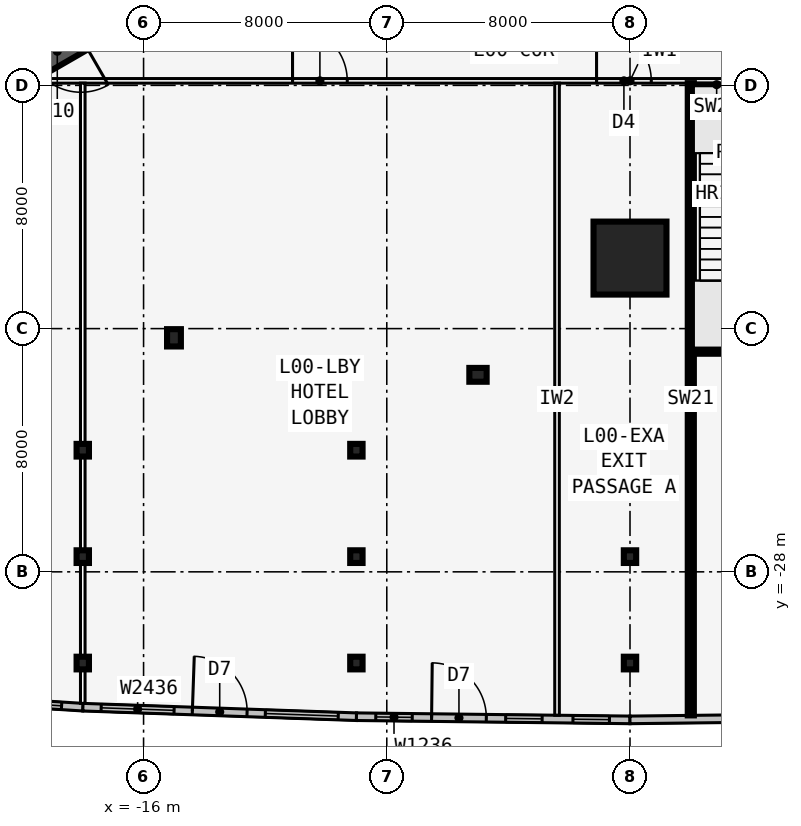
"""IFC4 building model, lengths in metres.
Left out: names, types, materials, properties, quantities, classifications, styles, units other than length and angle.
Written with IfcOpenShell. Run it as: python <this file> out.ifc"""

import sys

from ifc_helpers import new_model, si_unit, direction, frame, frame_2d, origin, origin_2d, place, context, subcontext, project, spatial, rectangle, i_section, extrude, element, fill, save


model = new_model("IFC4")
c1 = context("Model", 3, precision=1e-05, world=origin(), true_north=direction((0.0, 1.0)))
c2 = subcontext(c1, "Body", "Model", "MODEL_VIEW")
j1 = project(units=[si_unit("LENGTHUNIT", "METRE"), si_unit("PLANEANGLEUNIT", "RADIAN")], contexts=[c1])
p1 = place(None, origin())
s1 = spatial("IfcSite", under=j1, at=p1, CompositionType="ELEMENT")
p2 = place(p1, origin())
s2 = spatial("IfcBuilding", under=s1, at=p2, CompositionType="ELEMENT")
p3 = place(p2, origin())
s3 = spatial("IfcBuildingStorey", under=s2, at=p3, CompositionType="ELEMENT", Elevation=0.0)
p4 = place(p3, frame((-16.5, -9.526, -0.3), z_axis=(0.0, 0.0, 1.0), x_axis=(-0.866031398331, -0.499989616998, 0.0)))
e1 = element("IfcWall", 1, at=p4, inside=s3, PredefinedType="SHEAR", context=c2, shape_type="SweptSolid", body=[
    extrude(rectangle(XDim=4.746, YDim=0.9, at=frame_2d((2.373, 0.0))), origin(), (0.0, 0.0, 1.0), 6.3),
])
p5 = place(p4, frame((1.8, 0.0, 0.3)))
e2 = element("IfcOpeningElement", 2, at=p5, cuts=e1, PredefinedType="OPENING", context=c2, shape_type="SweptSolid", body=[
    extrude(rectangle(XDim=1.8, YDim=2.13, at=frame_2d((0.9, 1.065))), frame((0.0, 0.46, 0.0), z_axis=(0.0, -1.0, 0.0), x_axis=(1.0, 0.0, 0.0)), (0.0, 0.0, 1.0), 0.92),
])
for number, where, z_axis, x_axis in (
    (3, (-15.0, -20.303, -0.3), (0.0, 0.0, 1.0), (1.0, 0.0, 0.0)),
    (4, (-5.0, -21.521, -0.3), (0.0, 0.0, 1.0), (0.0, -1.0, 0.0)),
):
    element("IfcColumn", number, at=place(p3, frame(where, z_axis=z_axis, x_axis=x_axis)), inside=s3, PredefinedType="COLUMN", context=c2, shape_type="SweptSolid", body=[
        extrude(i_section(OverallWidth=0.455, OverallDepth=0.569, WebThickness=0.078, FlangeThickness=0.125, at=origin_2d()), origin(), (0.0, 0.0, 1.0), 6.3),
    ])
for number, where, z_axis, x_axis in (
    (5, (-18.0, -24.0, -0.3), (0.0, 0.0, 1.0), (1.0, 0.0, 0.0)),
    (6, (-9.0, -24.0, -0.3), (0.0, 0.0, 1.0), (1.0, 0.0, 0.0)),
    (7, (0.0, -24.0, -0.3), (0.0, 0.0, 1.0), (1.0, 0.0, 0.0)),
    (8, (-18.0, -27.5, -0.3), (0.0, 0.0, 1.0), (1.0, 0.0, 0.0)),
    (9, (-9.0, -27.5, -0.3), (0.0, 0.0, 1.0), (1.0, 0.0, 0.0)),
    (10, (0.0, -27.5, -0.3), (0.0, 0.0, 1.0), (1.0, 0.0, 0.0)),
    (11, (-18.0, -31.0, -0.3), (0.0, 0.0, 1.0), (1.0, 0.0, 0.0)),
    (12, (-9.0, -31.0, -0.3), (0.0, 0.0, 1.0), (1.0, 0.0, 0.0)),
    (13, (0.0, -31.0, -0.3), (0.0, 0.0, 1.0), (1.0, 0.0, 0.0)),
):
    element("IfcColumn", number, at=place(p3, frame(where, z_axis=z_axis, x_axis=x_axis)), inside=s3, PredefinedType="COLUMN", context=c2, shape_type="SweptSolid", body=[
        extrude(i_section(OverallWidth=0.406, OverallDepth=0.417, WebThickness=0.03, FlangeThickness=0.048, at=origin_2d()), origin(), (0.0, 0.0, 1.0), 6.3),
    ])
p6 = place(p3, frame((0.0, -17.68, -0.3), z_axis=(0.0, 0.0, 1.0), x_axis=(0.0, -1.0, 0.0)))
e14 = element("IfcColumn", 14, at=p6, inside=s3, PredefinedType="COLUMN", context=c2, shape_type="SweptSolid", body=[
    extrude(rectangle(XDim=2.4, YDim=2.4, at=origin_2d()), origin(), (0.0, 0.0, 1.0), 6.3),
])
p7 = place(p3, frame((-30.992, -31.629, -0.3), z_axis=(0.0, 0.0, 1.0), x_axis=(0.998006805525, -0.063106387361, 0.0)))
e15 = element("IfcWall", 15, at=p7, inside=s3, PredefinedType="STANDARD", context=c2, shape_type="SweptSolid", body=[
    extrude(rectangle(XDim=13.026, YDim=0.25, at=frame_2d((6.513, 0.0))), origin(), (0.0, 0.0, 1.0), 6.05),
])
p8 = place(p7, frame((5.613, 0.0, 0.3)))
e16 = element("IfcOpeningElement", 16, at=p8, cuts=e15, PredefinedType="OPENING", context=c2, shape_type="SweptSolid", body=[
    extrude(rectangle(XDim=1.8, YDim=2.7, at=frame_2d((0.9, 1.35))), frame((0.0, 0.135, 0.0), z_axis=(0.0, -1.0, 0.0), x_axis=(1.0, 0.0, 0.0)), (0.0, 0.0, 1.0), 0.27),
])
p9 = place(p7, frame((0.707, 0.0, 1.2)))
e17 = element("IfcOpeningElement", 17, at=p9, cuts=e15, PredefinedType="OPENING", context=c2, shape_type="SweptSolid", body=[
    extrude(rectangle(XDim=4.2, YDim=3.6, at=frame_2d((2.1, 1.8))), frame((0.0, 0.135, 0.0), z_axis=(0.0, -1.0, 0.0), x_axis=(1.0, 0.0, 0.0)), (0.0, 0.0, 1.0), 0.27),
])
p10 = place(p7, frame((8.119, 0.0, 1.2)))
e18 = element("IfcOpeningElement", 18, at=p10, cuts=e15, PredefinedType="OPENING", context=c2, shape_type="SweptSolid", body=[
    extrude(rectangle(XDim=4.2, YDim=3.6, at=frame_2d((2.1, 1.8))), frame((0.0, 0.135, 0.0), z_axis=(0.0, -1.0, 0.0), x_axis=(1.0, 0.0, 0.0)), (0.0, 0.0, 1.0), 0.27),
])
p11 = place(p3, frame((-17.996, -32.451, -0.3), z_axis=(0.0, 0.0, 1.0), x_axis=(0.999393961522, -0.034809620405, 0.0)))
e19 = element("IfcWall", 19, at=p11, inside=s3, PredefinedType="STANDARD", context=c2, shape_type="SweptSolid", body=[
    extrude(rectangle(XDim=9.005, YDim=0.25, at=frame_2d((4.503, 0.0))), origin(), (0.0, 0.0, 1.0), 6.05),
])
p12 = place(p11, frame((3.603, 0.0, 0.3)))
e20 = element("IfcOpeningElement", 20, at=p12, cuts=e19, PredefinedType="OPENING", context=c2, shape_type="SweptSolid", body=[
    extrude(rectangle(XDim=1.8, YDim=2.7, at=frame_2d((0.9, 1.35))), frame((0.0, 0.135, 0.0), z_axis=(0.0, -1.0, 0.0), x_axis=(1.0, 0.0, 0.0)), (0.0, 0.0, 1.0), 0.27),
])
p13 = place(p11, frame((0.601, 0.0, 1.2)))
e21 = element("IfcOpeningElement", 21, at=p13, cuts=e19, PredefinedType="OPENING", context=c2, shape_type="SweptSolid", body=[
    extrude(rectangle(XDim=2.4, YDim=3.6, at=frame_2d((1.2, 1.8))), frame((0.0, 0.135, 0.0), z_axis=(0.0, -1.0, 0.0), x_axis=(1.0, 0.0, 0.0)), (0.0, 0.0, 1.0), 0.27),
])
p14 = place(p11, frame((6.004, 0.0, 1.2)))
e22 = element("IfcOpeningElement", 22, at=p14, cuts=e19, PredefinedType="OPENING", context=c2, shape_type="SweptSolid", body=[
    extrude(rectangle(XDim=2.4, YDim=3.6, at=frame_2d((1.2, 1.8))), frame((0.0, 0.135, 0.0), z_axis=(0.0, -1.0, 0.0), x_axis=(1.0, 0.0, 0.0)), (0.0, 0.0, 1.0), 0.27),
])
p15 = place(p3, frame((-8.999, -32.765, -0.3), z_axis=(0.0, 0.0, 1.0), x_axis=(0.999932292689, -0.011636581857, 0.0)))
e23 = element("IfcWall", 23, at=p15, inside=s3, PredefinedType="STANDARD", context=c2, shape_type="SweptSolid", body=[
    extrude(rectangle(XDim=9.0, YDim=0.25, at=frame_2d((4.5, 0.0))), origin(), (0.0, 0.0, 1.0), 6.05),
])
p16 = place(p15, frame((2.473, 0.0, 0.3)))
e24 = element("IfcOpeningElement", 24, at=p16, cuts=e23, PredefinedType="OPENING", context=c2, shape_type="SweptSolid", body=[
    extrude(rectangle(XDim=1.8, YDim=2.7, at=frame_2d((0.9, 1.35))), frame((0.0, 0.135, 0.0), z_axis=(0.0, -1.0, 0.0), x_axis=(1.0, 0.0, 0.0)), (0.0, 0.0, 1.0), 0.27),
])
p17 = place(p15, frame((0.636, 0.0, 1.2)))
e25 = element("IfcOpeningElement", 25, at=p17, cuts=e23, PredefinedType="OPENING", context=c2, shape_type="SweptSolid", body=[
    extrude(rectangle(XDim=1.2, YDim=3.6, at=frame_2d((0.6, 1.8))), frame((0.0, 0.135, 0.0), z_axis=(0.0, -1.0, 0.0), x_axis=(1.0, 0.0, 0.0)), (0.0, 0.0, 1.0), 0.27),
])
p18 = place(p15, frame((4.909, 0.0, 1.2)))
e26 = element("IfcOpeningElement", 26, at=p18, cuts=e23, PredefinedType="OPENING", context=c2, shape_type="SweptSolid", body=[
    extrude(rectangle(XDim=1.2, YDim=3.6, at=frame_2d((0.6, 1.8))), frame((0.0, 0.135, 0.0), z_axis=(0.0, -1.0, 0.0), x_axis=(1.0, 0.0, 0.0)), (0.0, 0.0, 1.0), 0.27),
])
p19 = place(p15, frame((7.123, 0.0, 1.2)))
e27 = element("IfcOpeningElement", 27, at=p19, cuts=e23, PredefinedType="OPENING", context=c2, shape_type="SweptSolid", body=[
    extrude(rectangle(XDim=1.2, YDim=3.6, at=frame_2d((0.6, 1.8))), frame((0.0, 0.135, 0.0), z_axis=(0.0, -1.0, 0.0), x_axis=(1.0, 0.0, 0.0)), (0.0, 0.0, 1.0), 0.27),
])
p20 = place(p3, frame((8.999, -32.765, -0.3), z_axis=(0.0, 0.0, 1.0), x_axis=(-0.999932292689, -0.011636581857, 0.0)))
e28 = element("IfcWall", 28, at=p20, inside=s3, PredefinedType="STANDARD", context=c2, shape_type="SweptSolid", body=[
    extrude(rectangle(XDim=9.0, YDim=0.25, at=frame_2d((4.5, 0.0))), origin(), (0.0, 0.0, 1.0), 6.05),
])
p21 = place(p20, frame((3.495, 0.0, 0.3)))
e29 = element("IfcOpeningElement", 29, at=p21, cuts=e28, PredefinedType="OPENING", context=c2, shape_type="SweptSolid", body=[
    extrude(rectangle(XDim=1.8, YDim=2.7, at=frame_2d((0.9, 1.35))), frame((0.0, 0.135, 0.0), z_axis=(0.0, -1.0, 0.0), x_axis=(1.0, 0.0, 0.0)), (0.0, 0.0, 1.0), 0.27),
])
p22 = place(p3, frame((-19.527, -11.851, -0.3), z_axis=(0.0, 0.0, 1.0), x_axis=(1.0, 0.0, 0.0)))
e30 = element("IfcWall", 30, at=p22, inside=s3, PredefinedType="PARTITIONING", context=c2, shape_type="SweptSolid", body=[
    extrude(rectangle(XDim=39.054, YDim=0.15, at=frame_2d((19.527, 0.0))), origin(), (0.0, 0.0, 1.0), 5.108),
])
p23 = place(p22, frame((8.427, 0.0, 0.3)))
e31 = element("IfcOpeningElement", 31, at=p23, cuts=e30, PredefinedType="OPENING", context=c2, shape_type="SweptSolid", body=[
    extrude(rectangle(XDim=1.8, YDim=2.13, at=frame_2d((0.9, 1.065))), frame((0.0, 0.085, 0.0), z_axis=(0.0, -1.0, 0.0), x_axis=(1.0, 0.0, 0.0)), (0.0, 0.0, 1.0), 0.17),
])
p24 = place(p22, frame((18.427, 0.0, 0.3)))
e32 = element("IfcOpeningElement", 32, at=p24, cuts=e30, PredefinedType="OPENING", context=c2, shape_type="SweptSolid", body=[
    extrude(rectangle(XDim=1.8, YDim=2.13, at=frame_2d((0.9, 1.065))), frame((0.0, 0.085, 0.0), z_axis=(0.0, -1.0, 0.0), x_axis=(1.0, 0.0, 0.0)), (0.0, 0.0, 1.0), 0.17),
])
p25 = place(p22, frame((23.227, 0.0, 0.3)))
e33 = element("IfcOpeningElement", 33, at=p25, cuts=e30, PredefinedType="OPENING", context=c2, shape_type="SweptSolid", body=[
    extrude(rectangle(XDim=1.8, YDim=2.13, at=frame_2d((0.9, 1.065))), frame((0.0, 0.085, 0.0), z_axis=(0.0, -1.0, 0.0), x_axis=(1.0, 0.0, 0.0)), (0.0, 0.0, 1.0), 0.17),
])
p26 = place(p22, frame((28.127, 0.0, 0.3)))
e34 = element("IfcOpeningElement", 34, at=p26, cuts=e30, PredefinedType="OPENING", context=c2, shape_type="SweptSolid", body=[
    extrude(rectangle(XDim=1.0, YDim=2.13, at=frame_2d((0.5, 1.065))), frame((0.0, 0.085, 0.0), z_axis=(0.0, -1.0, 0.0), x_axis=(1.0, 0.0, 0.0)), (0.0, 0.0, 1.0), 0.17),
])
p27 = place(p22, frame((33.74, 0.0, 0.3)))
e35 = element("IfcOpeningElement", 35, at=p27, cuts=e30, PredefinedType="OPENING", context=c2, shape_type="SweptSolid", body=[
    extrude(rectangle(XDim=1.8, YDim=2.13, at=frame_2d((0.9, 1.065))), frame((0.0, 0.085, 0.0), z_axis=(0.0, -1.0, 0.0), x_axis=(1.0, 0.0, 0.0)), (0.0, 0.0, 1.0), 0.17),
])
p28 = place(p3, frame((-18.0, -11.926, -0.3), z_axis=(0.0, 0.0, 1.0), x_axis=(0.0, -1.0, 0.0)))
e36 = element("IfcWall", 36, at=p28, inside=s3, PredefinedType="PARTITIONING", context=c2, shape_type="SweptSolid", body=[
    extrude(rectangle(XDim=20.399, YDim=0.15, at=frame_2d((10.2, 0.0))), origin(), (0.0, 0.0, 1.0), 6.05),
])
p29 = place(p3, frame((-2.4, -11.926, -0.3), z_axis=(0.0, 0.0, 1.0), x_axis=(0.0, -1.0, 0.0)))
e37 = element("IfcWall", 37, at=p29, inside=s3, PredefinedType="PARTITIONING", context=c2, shape_type="SweptSolid", body=[
    extrude(rectangle(XDim=20.79, YDim=0.15, at=frame_2d((10.395, 0.0))), origin(), (0.0, 0.0, 1.0), 6.05),
])
p30 = place(p3, frame((2.0, -11.926, -0.3), z_axis=(0.0, 0.0, 1.0), x_axis=(0.0, -1.0, 0.0)))
e38 = element("IfcWall", 38, at=p30, inside=s3, PredefinedType="SHEAR", context=c2, shape_type="SweptSolid", body=[
    extrude(rectangle(XDim=20.795, YDim=0.2, at=frame_2d((10.397, 0.0))), origin(), (0.0, 0.0, 1.0), 6.3),
])
p31 = place(p3, frame((20.027, -10.985, -0.3), z_axis=(0.0, 0.0, 1.0), x_axis=(-0.500001677587, 0.866024435227, 0.0)))
e39 = element("IfcWall", 39, at=p31, inside=s3, PredefinedType="PARTITIONING", context=c2, shape_type="SweptSolid", body=[
    extrude(rectangle(XDim=39.054, YDim=0.15, at=frame_2d((19.527, 0.0))), origin(), (0.0, 0.0, 1.0), 5.108),
])
p32 = place(p31, frame((8.427, 0.0, 0.3)))
e40 = element("IfcOpeningElement", 40, at=p32, cuts=e39, PredefinedType="OPENING", context=c2, shape_type="SweptSolid", body=[
    extrude(rectangle(XDim=1.8, YDim=2.13, at=frame_2d((0.9, 1.065))), frame((0.0, 0.085, 0.0), z_axis=(0.0, -1.0, 0.0), x_axis=(1.0, 0.0, 0.0)), (0.0, 0.0, 1.0), 0.17),
])
p33 = place(p31, frame((18.427, 0.0, 0.3)))
e41 = element("IfcOpeningElement", 41, at=p33, cuts=e39, PredefinedType="OPENING", context=c2, shape_type="SweptSolid", body=[
    extrude(rectangle(XDim=1.8, YDim=2.13, at=frame_2d((0.9, 1.065))), frame((0.0, 0.085, 0.0), z_axis=(0.0, -1.0, 0.0), x_axis=(1.0, 0.0, 0.0)), (0.0, 0.0, 1.0), 0.17),
])
p34 = place(p31, frame((23.227, 0.0, 0.3)))
e42 = element("IfcOpeningElement", 42, at=p34, cuts=e39, PredefinedType="OPENING", context=c2, shape_type="SweptSolid", body=[
    extrude(rectangle(XDim=1.8, YDim=2.13, at=frame_2d((0.9, 1.065))), frame((0.0, 0.085, 0.0), z_axis=(0.0, -1.0, 0.0), x_axis=(1.0, 0.0, 0.0)), (0.0, 0.0, 1.0), 0.17),
])
p35 = place(p31, frame((27.627, 0.0, 0.3)))
e43 = element("IfcOpeningElement", 43, at=p35, cuts=e39, PredefinedType="OPENING", context=c2, shape_type="SweptSolid", body=[
    extrude(rectangle(XDim=1.0, YDim=2.13, at=frame_2d((0.5, 1.065))), frame((0.0, 0.085, 0.0), z_axis=(0.0, -1.0, 0.0), x_axis=(1.0, 0.0, 0.0)), (0.0, 0.0, 1.0), 0.17),
])
p36 = place(p31, frame((30.527, 0.0, 0.3)))
e44 = element("IfcOpeningElement", 44, at=p36, cuts=e39, PredefinedType="OPENING", context=c2, shape_type="SweptSolid", body=[
    extrude(rectangle(XDim=1.0, YDim=2.13, at=frame_2d((0.5, 1.065))), frame((0.0, 0.085, 0.0), z_axis=(0.0, -1.0, 0.0), x_axis=(1.0, 0.0, 0.0)), (0.0, 0.0, 1.0), 0.17),
])
p37 = place(p31, frame((33.277, 0.0, 0.3)))
e45 = element("IfcOpeningElement", 45, at=p37, cuts=e39, PredefinedType="OPENING", context=c2, shape_type="SweptSolid", body=[
    extrude(rectangle(XDim=1.0, YDim=2.13, at=frame_2d((0.5, 1.065))), frame((0.0, 0.085, 0.0), z_axis=(0.0, -1.0, 0.0), x_axis=(1.0, 0.0, 0.0)), (0.0, 0.0, 1.0), 0.17),
])
p38 = place(p31, frame((36.39, 0.0, 0.3)))
e46 = element("IfcOpeningElement", 46, at=p38, cuts=e39, PredefinedType="OPENING", context=c2, shape_type="SweptSolid", body=[
    extrude(rectangle(XDim=1.0, YDim=2.13, at=frame_2d((0.5, 1.065))), frame((0.0, 0.085, 0.0), z_axis=(0.0, -1.0, 0.0), x_axis=(1.0, 0.0, 0.0)), (0.0, 0.0, 1.0), 0.17),
])
p39 = place(p3, frame((-0.5, 22.836, -0.3), z_axis=(0.0, 0.0, 1.0), x_axis=(-0.500001677587, -0.866024435227, 0.0)))
e47 = element("IfcWall", 47, at=p39, inside=s3, PredefinedType="PARTITIONING", context=c2, shape_type="SweptSolid", body=[
    extrude(rectangle(XDim=39.054, YDim=0.15, at=frame_2d((19.527, 0.0))), origin(), (0.0, 0.0, 1.0), 5.108),
])
p40 = place(p39, frame((2.013, 0.0, 0.3)))
e48 = element("IfcOpeningElement", 48, at=p40, cuts=e47, PredefinedType="OPENING", context=c2, shape_type="SweptSolid", body=[
    extrude(rectangle(XDim=1.8, YDim=2.13, at=frame_2d((0.9, 1.065))), frame((0.0, 0.085, 0.0), z_axis=(0.0, -1.0, 0.0), x_axis=(1.0, 0.0, 0.0)), (0.0, 0.0, 1.0), 0.17),
])
p41 = place(p39, frame((10.427, 0.0, 0.3)))
e49 = element("IfcOpeningElement", 49, at=p41, cuts=e47, PredefinedType="OPENING", context=c2, shape_type="SweptSolid", body=[
    extrude(rectangle(XDim=1.8, YDim=2.13, at=frame_2d((0.9, 1.065))), frame((0.0, 0.085, 0.0), z_axis=(0.0, -1.0, 0.0), x_axis=(1.0, 0.0, 0.0)), (0.0, 0.0, 1.0), 0.17),
])
p42 = place(p39, frame((18.427, 0.0, 0.3)))
e50 = element("IfcOpeningElement", 50, at=p42, cuts=e47, PredefinedType="OPENING", context=c2, shape_type="SweptSolid", body=[
    extrude(rectangle(XDim=1.8, YDim=2.13, at=frame_2d((0.9, 1.065))), frame((0.0, 0.085, 0.0), z_axis=(0.0, -1.0, 0.0), x_axis=(1.0, 0.0, 0.0)), (0.0, 0.0, 1.0), 0.17),
])
p43 = place(p39, frame((23.227, 0.0, 0.3)))
e51 = element("IfcOpeningElement", 51, at=p43, cuts=e47, PredefinedType="OPENING", context=c2, shape_type="SweptSolid", body=[
    extrude(rectangle(XDim=1.8, YDim=2.13, at=frame_2d((0.9, 1.065))), frame((0.0, 0.085, 0.0), z_axis=(0.0, -1.0, 0.0), x_axis=(1.0, 0.0, 0.0)), (0.0, 0.0, 1.0), 0.17),
])
p44 = place(p39, frame((27.627, 0.0, 0.3)))
e52 = element("IfcOpeningElement", 52, at=p44, cuts=e47, PredefinedType="OPENING", context=c2, shape_type="SweptSolid", body=[
    extrude(rectangle(XDim=1.0, YDim=2.13, at=frame_2d((0.5, 1.065))), frame((0.0, 0.085, 0.0), z_axis=(0.0, -1.0, 0.0), x_axis=(1.0, 0.0, 0.0)), (0.0, 0.0, 1.0), 0.17),
])
p45 = place(p39, frame((30.277, 0.0, 0.3)))
e53 = element("IfcOpeningElement", 53, at=p45, cuts=e47, PredefinedType="OPENING", context=c2, shape_type="SweptSolid", body=[
    extrude(rectangle(XDim=1.0, YDim=2.13, at=frame_2d((0.5, 1.065))), frame((0.0, 0.085, 0.0), z_axis=(0.0, -1.0, 0.0), x_axis=(1.0, 0.0, 0.0)), (0.0, 0.0, 1.0), 0.17),
])
p46 = place(p39, frame((34.89, 0.0, 0.3)))
e54 = element("IfcOpeningElement", 54, at=p46, cuts=e47, PredefinedType="OPENING", context=c2, shape_type="SweptSolid", body=[
    extrude(rectangle(XDim=1.0, YDim=2.13, at=frame_2d((0.5, 1.065))), frame((0.0, 0.085, 0.0), z_axis=(0.0, -1.0, 0.0), x_axis=(1.0, 0.0, 0.0)), (0.0, 0.0, 1.0), 0.17),
])
p47 = place(p3, frame((2.0, -20.726, -0.3), z_axis=(0.0, 0.0, 1.0), x_axis=(1.0, 0.0, 0.0)))
e55 = element("IfcWall", 55, at=p47, inside=s3, PredefinedType="SHEAR", context=c2, shape_type="SweptSolid", body=[
    extrude(rectangle(XDim=5.2, YDim=0.2, at=frame_2d((2.6, 0.0))), origin(), (0.0, 0.0, 1.0), 6.3),
])
p48 = place(p3, frame((2.1, -11.976, -0.3), z_axis=(0.0, 0.0, 1.0), x_axis=(1.0, 0.0, 0.0)))
e56 = element("IfcWall", 56, at=p48, inside=s3, PredefinedType="SOLIDWALL", context=c2, shape_type="SweptSolid", body=[
    extrude(rectangle(XDim=1.5, YDim=0.1, at=frame_2d((0.75, 0.0))), origin(), (0.0, 0.0, 1.0), 6.3),
])
p49 = place(p10, origin())
e57 = element("IfcWindow", 57, at=p49, inside=s3, PartitioningType="SINGLE_PANEL", PredefinedType="WINDOW", context=c2, shape_type="SweptSolid", body=[
    extrude(rectangle(XDim=4.2, YDim=3.6, at=frame_2d((2.1, 1.8))), frame((0.0, 0.03, 0.0), z_axis=(0.0, -1.0, 0.0), x_axis=(1.0, 0.0, 0.0)), (0.0, 0.0, 1.0), 0.06),
])
fill(e18, e57)
p50 = place(p12, origin())
e58 = element("IfcDoor", 58, at=p50, inside=s3, OperationType="DOUBLE_DOOR_SINGLE_SWING", PredefinedType="DOOR", context=c2, shape_type="SweptSolid", body=[
    extrude(rectangle(XDim=1.8, YDim=2.7, at=frame_2d((0.9, 1.35))), frame((0.0, 0.025, 0.0), z_axis=(0.0, -1.0, 0.0), x_axis=(1.0, 0.0, 0.0)), (0.0, 0.0, 1.0), 0.05),
])
fill(e20, e58)
p51 = place(p13, origin())
e59 = element("IfcWindow", 59, at=p51, inside=s3, PartitioningType="SINGLE_PANEL", PredefinedType="WINDOW", context=c2, shape_type="SweptSolid", body=[
    extrude(rectangle(XDim=2.4, YDim=3.6, at=frame_2d((1.2, 1.8))), frame((0.0, 0.03, 0.0), z_axis=(0.0, -1.0, 0.0), x_axis=(1.0, 0.0, 0.0)), (0.0, 0.0, 1.0), 0.06),
])
fill(e21, e59)
p52 = place(p14, origin())
e60 = element("IfcWindow", 60, at=p52, inside=s3, PartitioningType="SINGLE_PANEL", PredefinedType="WINDOW", context=c2, shape_type="SweptSolid", body=[
    extrude(rectangle(XDim=2.4, YDim=3.6, at=frame_2d((1.2, 1.8))), frame((0.0, 0.03, 0.0), z_axis=(0.0, -1.0, 0.0), x_axis=(1.0, 0.0, 0.0)), (0.0, 0.0, 1.0), 0.06),
])
fill(e22, e60)
p53 = place(p16, origin())
e61 = element("IfcDoor", 61, at=p53, inside=s3, OperationType="DOUBLE_DOOR_SINGLE_SWING", PredefinedType="DOOR", context=c2, shape_type="SweptSolid", body=[
    extrude(rectangle(XDim=1.8, YDim=2.7, at=frame_2d((0.9, 1.35))), frame((0.0, 0.025, 0.0), z_axis=(0.0, -1.0, 0.0), x_axis=(1.0, 0.0, 0.0)), (0.0, 0.0, 1.0), 0.05),
])
fill(e24, e61)
p54 = place(p17, origin())
e62 = element("IfcWindow", 62, at=p54, inside=s3, PartitioningType="SINGLE_PANEL", PredefinedType="WINDOW", context=c2, shape_type="SweptSolid", body=[
    extrude(rectangle(XDim=1.2, YDim=3.6, at=frame_2d((0.6, 1.8))), frame((0.0, 0.03, 0.0), z_axis=(0.0, -1.0, 0.0), x_axis=(1.0, 0.0, 0.0)), (0.0, 0.0, 1.0), 0.06),
])
fill(e25, e62)
p55 = place(p18, origin())
e63 = element("IfcWindow", 63, at=p55, inside=s3, PartitioningType="SINGLE_PANEL", PredefinedType="WINDOW", context=c2, shape_type="SweptSolid", body=[
    extrude(rectangle(XDim=1.2, YDim=3.6, at=frame_2d((0.6, 1.8))), frame((0.0, 0.03, 0.0), z_axis=(0.0, -1.0, 0.0), x_axis=(1.0, 0.0, 0.0)), (0.0, 0.0, 1.0), 0.06),
])
fill(e26, e63)
p56 = place(p19, origin())
e64 = element("IfcWindow", 64, at=p56, inside=s3, PartitioningType="SINGLE_PANEL", PredefinedType="WINDOW", context=c2, shape_type="SweptSolid", body=[
    extrude(rectangle(XDim=1.2, YDim=3.6, at=frame_2d((0.6, 1.8))), frame((0.0, 0.03, 0.0), z_axis=(0.0, -1.0, 0.0), x_axis=(1.0, 0.0, 0.0)), (0.0, 0.0, 1.0), 0.06),
])
fill(e27, e64)
p57 = place(p23, origin())
e65 = element("IfcDoor", 65, at=p57, inside=s3, OperationType="DOUBLE_DOOR_SINGLE_SWING", PredefinedType="DOOR", context=c2, shape_type="SweptSolid", body=[
    extrude(rectangle(XDim=1.8, YDim=2.13, at=frame_2d((0.9, 1.065))), frame((0.0, 0.025, 0.0), z_axis=(0.0, -1.0, 0.0), x_axis=(1.0, 0.0, 0.0)), (0.0, 0.0, 1.0), 0.05),
])
fill(e31, e65)
p58 = place(p24, origin())
e66 = element("IfcDoor", 66, at=p58, inside=s3, OperationType="DOUBLE_DOOR_SINGLE_SWING", PredefinedType="DOOR", context=c2, shape_type="SweptSolid", body=[
    extrude(rectangle(XDim=1.8, YDim=2.13, at=frame_2d((0.9, 1.065))), frame((0.0, 0.025, 0.0), z_axis=(0.0, -1.0, 0.0), x_axis=(1.0, 0.0, 0.0)), (0.0, 0.0, 1.0), 0.05),
])
fill(e32, e66)
p59 = place(p5, origin())
e67 = element("IfcDoor", 67, at=p59, inside=s3, OperationType="DOUBLE_DOOR_DOUBLE_SWING", PredefinedType="DOOR", context=c2, shape_type="SweptSolid", body=[
    extrude(rectangle(XDim=1.8, YDim=2.13, at=frame_2d((0.9, 1.065))), frame((0.0, 0.025, 0.0), z_axis=(0.0, -1.0, 0.0), x_axis=(1.0, 0.0, 0.0)), (0.0, 0.0, 1.0), 0.05),
])
fill(e2, e67)
save(model, sys.argv[1])
